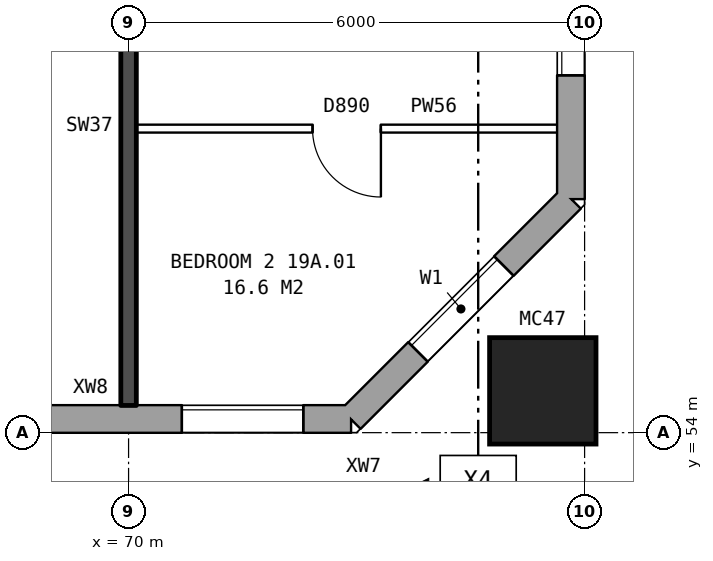
"""IFC4 building model, lengths in metres.
Left out: names, types, materials, properties, quantities, classifications, styles, units other than length and angle.
Written with IfcOpenShell. Run it as: python <this file> out.ifc"""

import sys

from ifc_helpers import new_model, si_unit, direction, frame, frame_2d, origin, origin_2d, place, context, subcontext, project, spatial, rectangle, hollow_rectangle, extrude, element, fill, save


model = new_model("IFC4")
c1 = context("Model", 3, precision=1e-05, world=origin(), true_north=direction((0.0, 1.0)))
c2 = subcontext(c1, "Body", "Model", "MODEL_VIEW")
j1 = project(units=[si_unit("LENGTHUNIT", "METRE"), si_unit("PLANEANGLEUNIT", "RADIAN")], contexts=[c1])
p1 = place(None, origin())
s1 = spatial("IfcSite", under=j1, at=p1, CompositionType="ELEMENT")
p2 = place(p1, origin())
s2 = spatial("IfcBuilding", under=s1, at=p2, CompositionType="ELEMENT")
p3 = place(p2, frame((0.0, 0.0, 71.6)))
s3 = spatial("IfcBuildingStorey", under=s2, at=p3, CompositionType="ELEMENT", Elevation=71.6)
p4 = place(p3, frame((75.45, 54.55, 0.0), z_axis=(0.0, 0.0, 1.0), x_axis=(1.0, 0.0, 0.0)))
e1 = element("IfcColumn", 1, at=p4, inside=s3, PredefinedType="COLUMN", context=c2, shape_type="SweptSolid", body=[
    extrude(hollow_rectangle(XDim=1.4, YDim=1.4, WallThickness=0.075, at=origin_2d()), origin(), (0.0, 0.0, 1.0), 3.1),
])
p5 = place(p3, frame((26.325, 54.18, 0.0), z_axis=(0.0, 0.0, 1.0), x_axis=(1.0, 0.0, 0.0)))
e2 = element("IfcWall", 2, at=p5, inside=s3, PredefinedType="STANDARD", context=c2, shape_type="SweptSolid", body=[
    extrude(rectangle(XDim=46.601, YDim=0.36, at=frame_2d((23.3, 0.0))), origin(), (0.0, 0.0, 1.0), 2.85),
])
p6 = place(p5, frame((1.875, 0.0, 1.0)))
e3 = element("IfcOpeningElement", 3, at=p6, cuts=e2, PredefinedType="OPENING", context=c2, shape_type="SweptSolid", body=[
    extrude(rectangle(XDim=0.6, YDim=1.5, at=frame_2d((0.3, 0.75))), frame((0.0, 0.19, 0.0), z_axis=(0.0, -1.0, 0.0), x_axis=(1.0, 0.0, 0.0)), (0.0, 0.0, 1.0), 0.38),
])
p7 = place(p5, frame((5.375, 0.0, 0.8)))
e4 = element("IfcOpeningElement", 4, at=p7, cuts=e2, PredefinedType="OPENING", context=c2, shape_type="SweptSolid", body=[
    extrude(rectangle(XDim=1.6, YDim=1.8, at=frame_2d((0.8, 0.9))), frame((0.0, 0.19, 0.0), z_axis=(0.0, -1.0, 0.0), x_axis=(1.0, 0.0, 0.0)), (0.0, 0.0, 1.0), 0.38),
])
p8 = place(p5, frame((8.375, 0.0, 0.8)))
e5 = element("IfcOpeningElement", 5, at=p8, cuts=e2, PredefinedType="OPENING", context=c2, shape_type="SweptSolid", body=[
    extrude(rectangle(XDim=1.6, YDim=1.8, at=frame_2d((0.8, 0.9))), frame((0.0, 0.19, 0.0), z_axis=(0.0, -1.0, 0.0), x_axis=(1.0, 0.0, 0.0)), (0.0, 0.0, 1.0), 0.38),
])
p9 = place(p5, frame((11.375, 0.0, 0.8)))
e6 = element("IfcOpeningElement", 6, at=p9, cuts=e2, PredefinedType="OPENING", context=c2, shape_type="SweptSolid", body=[
    extrude(rectangle(XDim=1.6, YDim=1.8, at=frame_2d((0.8, 0.9))), frame((0.0, 0.19, 0.0), z_axis=(0.0, -1.0, 0.0), x_axis=(1.0, 0.0, 0.0)), (0.0, 0.0, 1.0), 0.38),
])
p10 = place(p5, frame((14.375, 0.0, 0.8)))
e7 = element("IfcOpeningElement", 7, at=p10, cuts=e2, PredefinedType="OPENING", context=c2, shape_type="SweptSolid", body=[
    extrude(rectangle(XDim=1.6, YDim=1.8, at=frame_2d((0.8, 0.9))), frame((0.0, 0.19, 0.0), z_axis=(0.0, -1.0, 0.0), x_axis=(1.0, 0.0, 0.0)), (0.0, 0.0, 1.0), 0.38),
])
p11 = place(p5, frame((17.375, 0.0, 0.8)))
e8 = element("IfcOpeningElement", 8, at=p11, cuts=e2, PredefinedType="OPENING", context=c2, shape_type="SweptSolid", body=[
    extrude(rectangle(XDim=1.6, YDim=1.8, at=frame_2d((0.8, 0.9))), frame((0.0, 0.19, 0.0), z_axis=(0.0, -1.0, 0.0), x_axis=(1.0, 0.0, 0.0)), (0.0, 0.0, 1.0), 0.38),
])
p12 = place(p5, frame((20.375, 0.0, 0.8)))
e9 = element("IfcOpeningElement", 9, at=p12, cuts=e2, PredefinedType="OPENING", context=c2, shape_type="SweptSolid", body=[
    extrude(rectangle(XDim=1.6, YDim=1.8, at=frame_2d((0.8, 0.9))), frame((0.0, 0.19, 0.0), z_axis=(0.0, -1.0, 0.0), x_axis=(1.0, 0.0, 0.0)), (0.0, 0.0, 1.0), 0.38),
])
p13 = place(p5, frame((23.375, 0.0, 0.8)))
e10 = element("IfcOpeningElement", 10, at=p13, cuts=e2, PredefinedType="OPENING", context=c2, shape_type="SweptSolid", body=[
    extrude(rectangle(XDim=1.6, YDim=1.8, at=frame_2d((0.8, 0.9))), frame((0.0, 0.19, 0.0), z_axis=(0.0, -1.0, 0.0), x_axis=(1.0, 0.0, 0.0)), (0.0, 0.0, 1.0), 0.38),
])
p14 = place(p5, frame((26.375, 0.0, 0.8)))
e11 = element("IfcOpeningElement", 11, at=p14, cuts=e2, PredefinedType="OPENING", context=c2, shape_type="SweptSolid", body=[
    extrude(rectangle(XDim=1.6, YDim=1.8, at=frame_2d((0.8, 0.9))), frame((0.0, 0.19, 0.0), z_axis=(0.0, -1.0, 0.0), x_axis=(1.0, 0.0, 0.0)), (0.0, 0.0, 1.0), 0.38),
])
p15 = place(p5, frame((29.375, 0.0, 0.8)))
e12 = element("IfcOpeningElement", 12, at=p15, cuts=e2, PredefinedType="OPENING", context=c2, shape_type="SweptSolid", body=[
    extrude(rectangle(XDim=1.6, YDim=1.8, at=frame_2d((0.8, 0.9))), frame((0.0, 0.19, 0.0), z_axis=(0.0, -1.0, 0.0), x_axis=(1.0, 0.0, 0.0)), (0.0, 0.0, 1.0), 0.38),
])
p16 = place(p5, frame((32.375, 0.0, 0.8)))
e13 = element("IfcOpeningElement", 13, at=p16, cuts=e2, PredefinedType="OPENING", context=c2, shape_type="SweptSolid", body=[
    extrude(rectangle(XDim=1.6, YDim=1.8, at=frame_2d((0.8, 0.9))), frame((0.0, 0.19, 0.0), z_axis=(0.0, -1.0, 0.0), x_axis=(1.0, 0.0, 0.0)), (0.0, 0.0, 1.0), 0.38),
])
p17 = place(p5, frame((35.375, 0.0, 0.8)))
e14 = element("IfcOpeningElement", 14, at=p17, cuts=e2, PredefinedType="OPENING", context=c2, shape_type="SweptSolid", body=[
    extrude(rectangle(XDim=1.6, YDim=1.8, at=frame_2d((0.8, 0.9))), frame((0.0, 0.19, 0.0), z_axis=(0.0, -1.0, 0.0), x_axis=(1.0, 0.0, 0.0)), (0.0, 0.0, 1.0), 0.38),
])
p18 = place(p5, frame((38.375, 0.0, 0.8)))
e15 = element("IfcOpeningElement", 15, at=p18, cuts=e2, PredefinedType="OPENING", context=c2, shape_type="SweptSolid", body=[
    extrude(rectangle(XDim=1.6, YDim=1.8, at=frame_2d((0.8, 0.9))), frame((0.0, 0.19, 0.0), z_axis=(0.0, -1.0, 0.0), x_axis=(1.0, 0.0, 0.0)), (0.0, 0.0, 1.0), 0.38),
])
p19 = place(p5, frame((40.275, 0.0, 0.8)))
e16 = element("IfcOpeningElement", 16, at=p19, cuts=e2, PredefinedType="OPENING", context=c2, shape_type="SweptSolid", body=[
    extrude(rectangle(XDim=0.6, YDim=1.8, at=frame_2d((0.3, 0.9))), frame((0.0, 0.19, 0.0), z_axis=(0.0, -1.0, 0.0), x_axis=(1.0, 0.0, 0.0)), (0.0, 0.0, 1.0), 0.38),
])
p20 = place(p5, frame((44.375, 0.0, 0.8)))
e17 = element("IfcOpeningElement", 17, at=p20, cuts=e2, PredefinedType="OPENING", context=c2, shape_type="SweptSolid", body=[
    extrude(rectangle(XDim=1.6, YDim=1.8, at=frame_2d((0.8, 0.9))), frame((0.0, 0.19, 0.0), z_axis=(0.0, -1.0, 0.0), x_axis=(1.0, 0.0, 0.0)), (0.0, 0.0, 1.0), 0.38),
])
p21 = place(p5, frame((2.775, 0.0, 1.7)))
e18 = element("IfcOpeningElement", 18, at=p21, cuts=e2, PredefinedType="OPENING", context=c2, shape_type="SweptSolid", body=[
    extrude(rectangle(XDim=0.6, YDim=0.9, at=frame_2d((0.3, 0.45))), frame((0.0, 0.19, 0.0), z_axis=(0.0, -1.0, 0.0), x_axis=(1.0, 0.0, 0.0)), (0.0, 0.0, 1.0), 0.38),
])
p22 = place(p5, frame((41.175, 0.0, 0.8)))
e19 = element("IfcOpeningElement", 19, at=p22, cuts=e2, PredefinedType="OPENING", context=c2, shape_type="SweptSolid", body=[
    extrude(rectangle(XDim=0.8, YDim=0.9, at=frame_2d((0.4, 0.45))), frame((0.0, 0.19, 0.0), z_axis=(0.0, -1.0, 0.0), x_axis=(1.0, 0.0, 0.0)), (0.0, 0.0, 1.0), 0.38),
])
p23 = place(p3, frame((72.925, 54.18, 0.0), z_axis=(0.0, 0.0, 1.0), x_axis=(0.707106781187, 0.707106781187, 0.0)))
e20 = element("IfcWall", 20, at=p23, inside=s3, PredefinedType="STANDARD", context=c2, shape_type="SweptSolid", body=[
    extrude(rectangle(XDim=4.094, YDim=0.36, at=frame_2d((2.047, 0.0))), origin(), (0.0, 0.0, 1.0), 2.85),
])
p24 = place(p23, frame((1.247, 0.0, 0.8)))
e21 = element("IfcOpeningElement", 21, at=p24, cuts=e20, PredefinedType="OPENING", context=c2, shape_type="SweptSolid", body=[
    extrude(rectangle(XDim=1.6, YDim=1.8, at=frame_2d((0.8, 0.9))), frame((0.0, 0.19, 0.0), z_axis=(0.0, -1.0, 0.0), x_axis=(1.0, 0.0, 0.0)), (0.0, 0.0, 1.0), 0.38),
])
p25 = place(p3, frame((75.82, 57.075, 0.0), z_axis=(0.0, 0.0, 1.0), x_axis=(0.0, 1.0, 0.0)))
e22 = element("IfcWall", 22, at=p25, inside=s3, PredefinedType="STANDARD", context=c2, shape_type="SweptSolid", body=[
    extrude(rectangle(XDim=25.851, YDim=0.36, at=frame_2d((12.925, 0.0))), origin(), (0.0, 0.0, 1.0), 2.85),
])
p26 = place(p25, frame((1.625, 0.0, 0.8)))
e23 = element("IfcOpeningElement", 23, at=p26, cuts=e22, PredefinedType="OPENING", context=c2, shape_type="SweptSolid", body=[
    extrude(rectangle(XDim=1.6, YDim=1.8, at=frame_2d((0.8, 0.9))), frame((0.0, 0.19, 0.0), z_axis=(0.0, -1.0, 0.0), x_axis=(1.0, 0.0, 0.0)), (0.0, 0.0, 1.0), 0.38),
])
p27 = place(p25, frame((3.525, 0.0, 1.7)))
e24 = element("IfcOpeningElement", 24, at=p27, cuts=e22, PredefinedType="OPENING", context=c2, shape_type="SweptSolid", body=[
    extrude(rectangle(XDim=1.2, YDim=0.9, at=frame_2d((0.6, 0.45))), frame((0.0, 0.19, 0.0), z_axis=(0.0, -1.0, 0.0), x_axis=(1.0, 0.0, 0.0)), (0.0, 0.0, 1.0), 0.38),
])
p28 = place(p25, frame((19.225, 0.0, 0.8)))
e25 = element("IfcOpeningElement", 25, at=p28, cuts=e22, PredefinedType="OPENING", context=c2, shape_type="SweptSolid", body=[
    extrude(rectangle(XDim=0.8, YDim=0.9, at=frame_2d((0.4, 0.45))), frame((0.0, 0.19, 0.0), z_axis=(0.0, -1.0, 0.0), x_axis=(1.0, 0.0, 0.0)), (0.0, 0.0, 1.0), 0.38),
])
p29 = place(p25, frame((22.625, 0.0, 0.8)))
e26 = element("IfcOpeningElement", 26, at=p29, cuts=e22, PredefinedType="OPENING", context=c2, shape_type="SweptSolid", body=[
    extrude(rectangle(XDim=1.6, YDim=1.8, at=frame_2d((0.8, 0.9))), frame((0.0, 0.19, 0.0), z_axis=(0.0, -1.0, 0.0), x_axis=(1.0, 0.0, 0.0)), (0.0, 0.0, 1.0), 0.38),
])
p30 = place(p25, frame((5.775, 0.0, 0.8)))
e27 = element("IfcOpeningElement", 27, at=p30, cuts=e22, PredefinedType="OPENING", context=c2, shape_type="SweptSolid", body=[
    extrude(rectangle(XDim=0.8, YDim=0.9, at=frame_2d((0.4, 0.45))), frame((0.0, 0.19, 0.0), z_axis=(0.0, -1.0, 0.0), x_axis=(1.0, 0.0, 0.0)), (0.0, 0.0, 1.0), 0.38),
])
p31 = place(p25, frame((21.075, 0.0, 1.7)))
e28 = element("IfcOpeningElement", 28, at=p31, cuts=e22, PredefinedType="OPENING", context=c2, shape_type="SweptSolid", body=[
    extrude(rectangle(XDim=1.2, YDim=0.9, at=frame_2d((0.6, 0.45))), frame((0.0, 0.19, 0.0), z_axis=(0.0, -1.0, 0.0), x_axis=(1.0, 0.0, 0.0)), (0.0, 0.0, 1.0), 0.38),
])
p32 = place(p3, frame((70.1, 58.0, 0.0), z_axis=(0.0, 0.0, 1.0), x_axis=(1.0, 0.0, 0.0)))
e29 = element("IfcWall", 29, at=p32, inside=s3, PredefinedType="PARTITIONING", context=c2, shape_type="SweptSolid", body=[
    extrude(rectangle(XDim=5.54, YDim=0.1, at=frame_2d((2.77, 0.0))), origin(), (0.0, 0.0, 1.0), 2.85),
])
p33 = place(p32, frame((2.32, 0.0, 0.0)))
e30 = element("IfcOpeningElement", 30, at=p33, cuts=e29, PredefinedType="OPENING", context=c2, shape_type="SweptSolid", body=[
    extrude(rectangle(XDim=0.9, YDim=2.1, at=frame_2d((0.45, 1.05))), frame((0.0, 0.06, 0.0), z_axis=(0.0, -1.0, 0.0), x_axis=(1.0, 0.0, 0.0)), (0.0, 0.0, 1.0), 0.12),
])
p34 = place(p3, frame((70.0, 54.36, 0.0), z_axis=(0.0, 0.0, 1.0), x_axis=(0.0, 1.0, 0.0)))
e31 = element("IfcWall", 31, at=p34, inside=s3, PredefinedType="SOLIDWALL", context=c2, shape_type="SweptSolid", body=[
    extrude(rectangle(XDim=9.44, YDim=0.2, at=frame_2d((4.72, 0.0))), origin(), (0.0, 0.0, 1.0), 2.85),
])
p35 = place(p34, frame((7.34, 0.0, 0.0)))
e32 = element("IfcOpeningElement", 32, at=p35, cuts=e31, PredefinedType="OPENING", context=c2, shape_type="SweptSolid", body=[
    extrude(rectangle(XDim=0.9, YDim=2.1, at=frame_2d((0.45, 1.05))), frame((0.0, 0.11, 0.0), z_axis=(0.0, -1.0, 0.0), x_axis=(1.0, 0.0, 0.0)), (0.0, 0.0, 1.0), 0.22),
])
p36 = place(p20, origin())
e33 = element("IfcWindow", 33, at=p36, inside=s3, PartitioningType="SINGLE_PANEL", PredefinedType="WINDOW", context=c2, shape_type="SweptSolid", body=[
    extrude(rectangle(XDim=1.6, YDim=1.8, at=frame_2d((0.8, 0.9))), frame((0.0, 0.15, 0.0), z_axis=(0.0, -1.0, 0.0), x_axis=(1.0, 0.0, 0.0)), (0.0, 0.0, 1.0), 0.06),
])
fill(e17, e33)
p37 = place(p24, origin())
e34 = element("IfcWindow", 34, at=p37, inside=s3, PartitioningType="SINGLE_PANEL", PredefinedType="WINDOW", context=c2, shape_type="SweptSolid", body=[
    extrude(rectangle(XDim=1.6, YDim=1.8, at=frame_2d((0.8, 0.9))), frame((0.0, 0.15, 0.0), z_axis=(0.0, -1.0, 0.0), x_axis=(1.0, 0.0, 0.0)), (0.0, 0.0, 1.0), 0.06),
])
fill(e21, e34)
p38 = place(p26, origin())
e35 = element("IfcWindow", 35, at=p38, inside=s3, PartitioningType="SINGLE_PANEL", PredefinedType="WINDOW", context=c2, shape_type="SweptSolid", body=[
    extrude(rectangle(XDim=1.6, YDim=1.8, at=frame_2d((0.8, 0.9))), frame((0.0, 0.15, 0.0), z_axis=(0.0, -1.0, 0.0), x_axis=(1.0, 0.0, 0.0)), (0.0, 0.0, 1.0), 0.06),
])
fill(e23, e35)
p39 = place(p33, frame((0.9, 0.0, 0.0), z_axis=(0.0, 0.0, 1.0), x_axis=(-1.0, 0.0, 0.0)))
e36 = element("IfcDoor", 36, at=p39, inside=s3, OperationType="SINGLE_SWING_LEFT", PredefinedType="DOOR", context=c2, shape_type="SweptSolid", body=[
    extrude(rectangle(XDim=0.9, YDim=2.1, at=frame_2d((0.45, 1.05))), frame((0.0, 0.025, 0.0), z_axis=(0.0, -1.0, 0.0), x_axis=(1.0, 0.0, 0.0)), (0.0, 0.0, 1.0), 0.05),
])
fill(e30, e36)
save(model, sys.argv[1])
